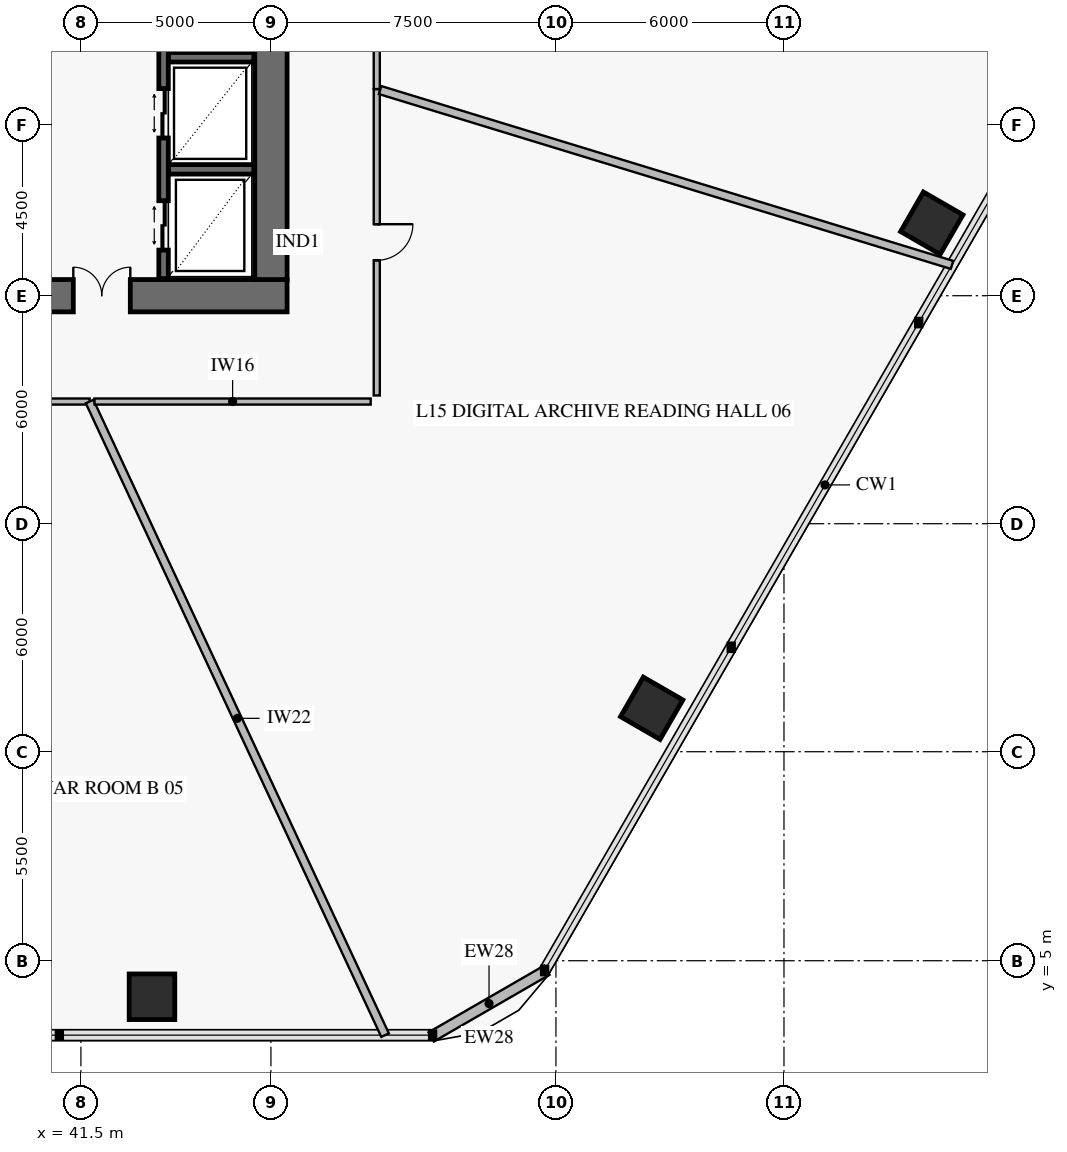
"""IFC4 building model, lengths in metres.
Left out: names, types, materials, properties, quantities, classifications, styles, units other than length and angle.
Written with IfcOpenShell. Run it as: python <this file> out.ifc"""

import sys

from ifc_helpers import new_model, si_unit, direction, frame, frame_2d, origin, origin_2d, place, context, subcontext, project, spatial, rectangle, extrude, element, fill, save


model = new_model("IFC4")
c1 = context("Model", 3, precision=1e-05, world=origin(), true_north=direction((0.0, 1.0)))
c2 = subcontext(c1, "Body", "Model", "MODEL_VIEW")
j1 = project(units=[si_unit("LENGTHUNIT", "METRE"), si_unit("PLANEANGLEUNIT", "RADIAN")], contexts=[c1])
p1 = place(None, origin())
s1 = spatial("IfcSite", under=j1, at=p1, CompositionType="ELEMENT")
p2 = place(p1, origin())
s2 = spatial("IfcBuilding", under=s1, at=p2, CompositionType="ELEMENT")
p3 = place(p2, frame((0.0, 0.0, 62.4)))
s3 = spatial("IfcBuildingStorey", under=s2, at=p3, CompositionType="ELEMENT", Elevation=62.4)
p4 = place(p3, frame((37.35, 22.5, 0.0), z_axis=(0.0, 0.0, 1.0), x_axis=(1.0, 0.0, 0.0)))
e1 = element("IfcWall", 1, at=p4, inside=s3, PredefinedType="SHEAR", context=c2, shape_type="SweptSolid", body=[
    extrude(rectangle(XDim=9.575, YDim=0.85, at=frame_2d((4.788, 0.0))), origin(), (0.0, 0.0, 1.0), 4.2),
])
p5 = place(p4, frame((3.95, 0.0, 0.0)))
e2 = element("IfcOpeningElement", 2, at=p5, cuts=e1, PredefinedType="OPENING", context=c2, shape_type="SweptSolid", body=[
    extrude(rectangle(XDim=1.5, YDim=2.15, at=frame_2d((0.75, 1.075))), frame((0.0, 0.437, 0.0), z_axis=(0.0, -1.0, 0.0), x_axis=(1.0, 0.0, 0.0)), (0.0, 0.0, 1.0), 0.874),
])
p6 = place(p3, frame((46.5, 22.925, 0.0), z_axis=(0.0, 0.0, 1.0), x_axis=(0.0, 1.0, 0.0)))
e3 = element("IfcWall", 3, at=p6, inside=s3, PredefinedType="SHEAR", context=c2, shape_type="SweptSolid", body=[
    extrude(rectangle(XDim=18.15, YDim=0.85, at=frame_2d((9.075, 0.0))), origin(), (0.0, 0.0, 1.0), 4.2),
])
p7 = place(p6, frame((8.825, 0.0, 0.0)))
e4 = element("IfcOpeningElement", 4, at=p7, cuts=e3, PredefinedType="OPENING", context=c2, shape_type="SweptSolid", body=[
    extrude(rectangle(XDim=1.1, YDim=2.15, at=frame_2d((0.55, 1.075))), frame((0.0, 0.437, 0.0), z_axis=(0.0, -1.0, 0.0), x_axis=(1.0, 0.0, 0.0)), (0.0, 0.0, 1.0), 0.874),
])
for number, where, z_axis, x_axis in (
    (5, (43.37, 4.052, 0.0), (0.0, 0.0, 1.0), (1.0, 0.0, 0.0)),
    (6, (56.519, 11.643, 0.0), (0.0, 0.0, 1.0), (0.5, 0.866, 0.0)),
    (7, (63.889, 24.408, 0.0), (0.0, 0.0, 1.0), (0.5, 0.866, 0.0)),
):
    element("IfcColumn", number, at=place(p3, frame(where, z_axis=z_axis, x_axis=x_axis)), inside=s3, PredefinedType="COLUMN", context=c2, shape_type="SweptSolid", body=[
        extrude(rectangle(XDim=1.2, YDim=1.2, at=origin_2d()), origin(), (0.0, 0.0, 1.0), 3.92),
    ])
p8 = place(p3, frame((53.761, 4.751, 0.0), z_axis=(0.0, 0.0, 1.0), x_axis=(-0.866007452331, -0.500031091541, 0.0)))
e8 = element("IfcWall", 8, at=p8, inside=s3, PredefinedType="SOLIDWALL", context=c2, shape_type="SweptSolid", body=[
    extrude(rectangle(XDim=3.515, YDim=0.28, at=frame_2d((1.757, 0.0))), origin(), (0.0, 0.0, 1.0), 3.92),
])
for number, where, z_axis, x_axis in (
    (9, (43.8, 25.825, 0.0), (0.0, 0.0, 1.0), (1.0, 0.0, 0.0)),
    (10, (43.8, 28.775, 0.0), (0.0, 0.0, 1.0), (1.0, 0.0, 0.0)),
):
    element("IfcWall", number, at=place(p3, frame(where, z_axis=z_axis, x_axis=x_axis)), inside=s3, PredefinedType="SOLIDWALL", context=c2, shape_type="SweptSolid", body=[
        extrude(rectangle(XDim=2.25, YDim=0.25, at=frame_2d((1.125, 0.0))), origin(), (0.0, 0.0, 1.0), 4.2),
    ])
p9 = place(p3, frame((43.675, 22.95, 0.0), z_axis=(0.0, 0.0, 1.0), x_axis=(0.0, 1.0, 0.0)))
e11 = element("IfcWall", 11, at=p9, inside=s3, PredefinedType="SOLIDWALL", context=c2, shape_type="SweptSolid", body=[
    extrude(rectangle(XDim=8.2, YDim=0.25, at=frame_2d((4.1, 0.0))), origin(), (0.0, 0.0, 1.0), 4.2),
])
p10 = place(p9, frame((0.75, 0.0, 0.0)))
e12 = element("IfcOpeningElement", 12, at=p10, cuts=e11, PredefinedType="OPENING", context=c2, shape_type="SweptSolid", body=[
    extrude(rectangle(XDim=1.3, YDim=2.3, at=frame_2d((0.65, 1.15))), frame((0.0, 0.137, 0.0), z_axis=(0.0, -1.0, 0.0), x_axis=(1.0, 0.0, 0.0)), (0.0, 0.0, 1.0), 0.274),
])
p11 = place(p9, frame((3.7, 0.0, 0.0)))
e13 = element("IfcOpeningElement", 13, at=p11, cuts=e11, PredefinedType="OPENING", context=c2, shape_type="SweptSolid", body=[
    extrude(rectangle(XDim=1.3, YDim=2.3, at=frame_2d((0.65, 1.15))), frame((0.0, 0.137, 0.0), z_axis=(0.0, -1.0, 0.0), x_axis=(1.0, 0.0, 0.0)), (0.0, 0.0, 1.0), 0.274),
])
p12 = place(p9, frame((6.62, 0.0, 0.0)))
e14 = element("IfcOpeningElement", 14, at=p12, cuts=e11, PredefinedType="OPENING", context=c2, shape_type="SweptSolid", body=[
    extrude(rectangle(XDim=0.9, YDim=2.1, at=frame_2d((0.45, 1.05))), frame((0.0, 0.137, 0.0), z_axis=(0.0, -1.0, 0.0), x_axis=(1.0, 0.0, 0.0)), (0.0, 0.0, 1.0), 0.274),
])
p13 = place(p3, frame((36.214, 19.715, 0.0), z_axis=(0.0, 0.0, 1.0), x_axis=(1.0, 0.0, 0.0)))
e15 = element("IfcWall", 15, at=p13, inside=s3, PredefinedType="PARTITIONING", context=c2, shape_type="SweptSolid", body=[
    extrude(rectangle(XDim=5.514, YDim=0.16, at=frame_2d((2.757, 0.0))), origin(), (0.0, 0.0, 1.0), 3.22),
])
p14 = place(p13, frame((2.182, 0.0, 0.0)))
e16 = element("IfcOpeningElement", 16, at=p14, cuts=e15, PredefinedType="OPENING", context=c2, shape_type="SweptSolid", body=[
    extrude(rectangle(XDim=1.15, YDim=2.2, at=frame_2d((0.575, 1.1))), frame((0.0, 0.092, 0.0), z_axis=(0.0, -1.0, 0.0), x_axis=(1.0, 0.0, 0.0)), (0.0, 0.0, 1.0), 0.184),
])
p15 = place(p3, frame((49.285, 19.875, 0.0), z_axis=(0.0, 0.0, 1.0), x_axis=(0.0, 1.0, 0.0)))
e17 = element("IfcWall", 17, at=p15, inside=s3, PredefinedType="PARTITIONING", context=c2, shape_type="SweptSolid", body=[
    extrude(rectangle(XDim=8.063, YDim=0.16, at=frame_2d((4.032, 0.0))), origin(), (0.0, 0.0, 1.0), 3.92),
])
p16 = place(p15, frame((3.557, 0.0, 0.0)))
e18 = element("IfcOpeningElement", 18, at=p16, cuts=e17, PredefinedType="OPENING", context=c2, shape_type="SweptSolid", body=[
    extrude(rectangle(XDim=0.95, YDim=2.1, at=frame_2d((0.475, 1.05))), frame((0.0, 0.092, 0.0), z_axis=(0.0, -1.0, 0.0), x_axis=(1.0, 0.0, 0.0)), (0.0, 0.0, 1.0), 0.184),
])
p17 = place(p3, frame((49.285, 27.938, 0.0), z_axis=(0.0, 0.0, 1.0), x_axis=(0.0, 1.0, 0.0)))
e19 = element("IfcWall", 19, at=p17, inside=s3, PredefinedType="PARTITIONING", context=c2, shape_type="SweptSolid", body=[
    extrude(rectangle(XDim=5.458, YDim=0.16, at=frame_2d((2.729, 0.0))), origin(), (0.0, 0.0, 1.0), 3.22),
])
p18 = place(p17, frame((2.254, 0.0, 0.0)))
e20 = element("IfcOpeningElement", 20, at=p18, cuts=e19, PredefinedType="OPENING", context=c2, shape_type="SweptSolid", body=[
    extrude(rectangle(XDim=0.95, YDim=2.1, at=frame_2d((0.475, 1.05))), frame((0.0, 0.092, 0.0), z_axis=(0.0, -1.0, 0.0), x_axis=(1.0, 0.0, 0.0)), (0.0, 0.0, 1.0), 0.184),
])
p19 = place(p3, frame((41.729, 19.715, 0.0), z_axis=(0.0, 0.0, 1.0), x_axis=(0.422623913369, -0.906305151617, 0.0)))
e21 = element("IfcWall", 21, at=p19, inside=s3, PredefinedType="PARTITIONING", context=c2, shape_type="SweptSolid", body=[
    extrude(rectangle(XDim=18.397, YDim=0.22, at=frame_2d((9.199, 0.0))), origin(), (0.0, 0.0, 1.0), 3.17),
])
p20 = place(p3, frame((41.859, 19.715, 0.0), z_axis=(0.0, 0.0, 1.0), x_axis=(1.0, 0.0, 0.0)))
e22 = element("IfcWall", 22, at=p20, inside=s3, PredefinedType="PARTITIONING", context=c2, shape_type="SweptSolid", body=[
    extrude(rectangle(XDim=7.266, YDim=0.16, at=frame_2d((3.633, 0.0))), origin(), (0.0, 0.0, 1.0), 3.22),
])
p21 = place(p3, frame((49.373, 27.912, 0.0), z_axis=(0.0, 0.0, 1.0), x_axis=(0.956304467386, -0.292372648614, 0.0)))
e23 = element("IfcWall", 23, at=p21, inside=s3, PredefinedType="PARTITIONING", context=c2, shape_type="SweptSolid", body=[
    extrude(rectangle(XDim=15.736, YDim=0.22, at=frame_2d((7.868, 0.0))), origin(), (0.0, 0.0, 1.0), 3.17),
])
p22 = place(p5, origin())
e24 = element("IfcDoor", 24, at=p22, inside=s3, OperationType="DOUBLE_DOOR_SINGLE_SWING", PredefinedType="DOOR", context=c2, shape_type="SweptSolid", body=[
    extrude(rectangle(XDim=1.5, YDim=2.15, at=frame_2d((0.75, 1.075))), frame((0.0, 0.025, 0.0), z_axis=(0.0, -1.0, 0.0), x_axis=(1.0, 0.0, 0.0)), (0.0, 0.0, 1.0), 0.05),
])
fill(e2, e24)
p23 = place(p10, origin())
e25 = element("IfcDoor", 25, at=p23, inside=s3, OperationType="DOUBLE_DOOR_SLIDING", PredefinedType="DOOR", context=c2, shape_type="SweptSolid", body=[
    extrude(rectangle(XDim=1.3, YDim=2.3, at=frame_2d((0.65, 1.15))), frame((0.0, 0.025, 0.0), z_axis=(0.0, -1.0, 0.0), x_axis=(1.0, 0.0, 0.0)), (0.0, 0.0, 1.0), 0.05),
])
fill(e12, e25)
p24 = place(p11, origin())
e26 = element("IfcDoor", 26, at=p24, inside=s3, OperationType="DOUBLE_DOOR_SLIDING", PredefinedType="DOOR", context=c2, shape_type="SweptSolid", body=[
    extrude(rectangle(XDim=1.3, YDim=2.3, at=frame_2d((0.65, 1.15))), frame((0.0, 0.025, 0.0), z_axis=(0.0, -1.0, 0.0), x_axis=(1.0, 0.0, 0.0)), (0.0, 0.0, 1.0), 0.05),
])
fill(e13, e26)
p25 = place(p16, frame((0.95, 0.0, 0.0), z_axis=(0.0, 0.0, 1.0), x_axis=(-1.0, 0.0, 0.0)))
e27 = element("IfcDoor", 27, at=p25, inside=s3, OperationType="SINGLE_SWING_LEFT", PredefinedType="DOOR", context=c2, shape_type="SweptSolid", body=[
    extrude(rectangle(XDim=0.95, YDim=2.1, at=frame_2d((0.475, 1.05))), frame((0.0, 0.025, 0.0), z_axis=(0.0, -1.0, 0.0), x_axis=(1.0, 0.0, 0.0)), (0.0, 0.0, 1.0), 0.05),
])
fill(e18, e27)
save(model, sys.argv[1])
